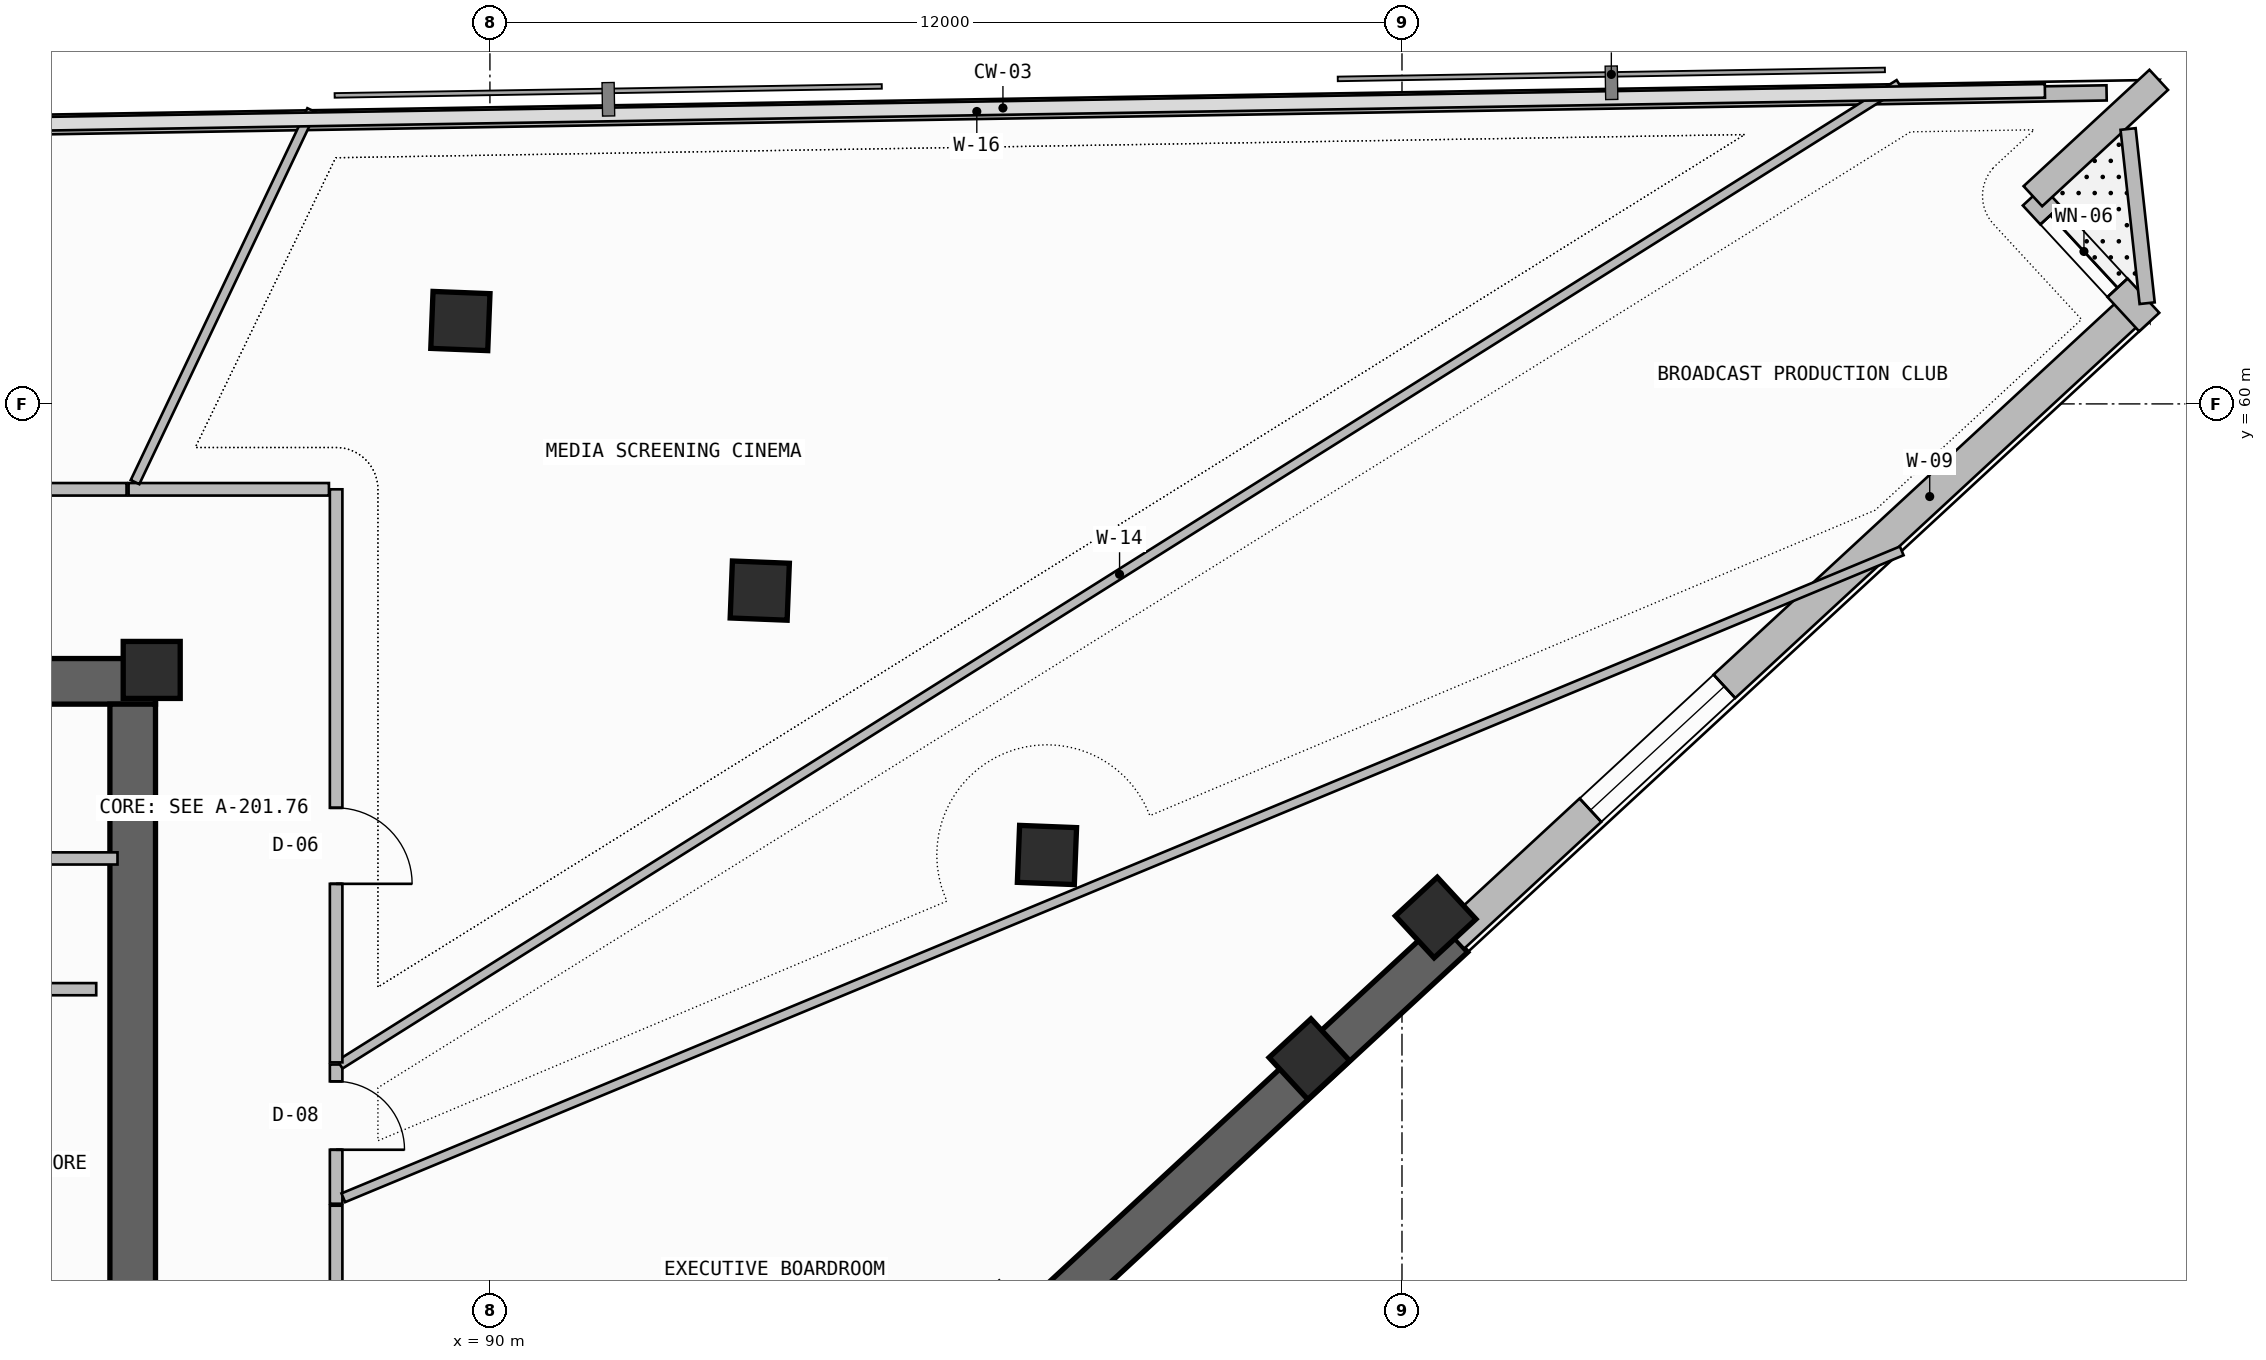
"""IFC4 building model, lengths in metres.
Left out: names, types, materials, properties, quantities, classifications, styles, units other than length and angle.
Written with IfcOpenShell. Run it as: python <this file> out.ifc"""

import sys

from ifc_helpers import new_model, si_unit, direction, frame, frame_2d, origin, origin_2d, place, context, subcontext, project, spatial, rectangle, extrude, element, fill, save


model = new_model("IFC4")
c1 = context("Model", 3, precision=1e-05, world=origin(), true_north=direction((0.0, 1.0)))
c2 = subcontext(c1, "Body", "Model", "MODEL_VIEW")
j1 = project(units=[si_unit("LENGTHUNIT", "METRE"), si_unit("PLANEANGLEUNIT", "RADIAN")], contexts=[c1])
p1 = place(None, origin())
s1 = spatial("IfcSite", under=j1, at=p1, CompositionType="ELEMENT")
p2 = place(p1, origin())
s2 = spatial("IfcBuilding", under=s1, at=p2, CompositionType="ELEMENT")
p3 = place(p2, frame((0.0, 0.0, 271.3)))
s3 = spatial("IfcBuildingStorey", under=s2, at=p3, CompositionType="ELEMENT", Elevation=271.3)
p4 = place(p3, frame((72.0, 56.35, -0.26), z_axis=(0.0, 0.0, 1.0), x_axis=(1.0, 0.0, 0.0)))
e1 = element("IfcWall", 1, at=p4, inside=s3, PredefinedType="SHEAR", context=c2, shape_type="SweptSolid", body=[
    extrude(rectangle(XDim=13.6, YDim=0.6, at=frame_2d((6.8, 0.0))), origin(), (0.0, 0.0, 1.0), 3.52),
])
p5 = place(p3, frame((85.3, 47.6, -0.26), z_axis=(0.0, 0.0, 1.0), x_axis=(0.0, 1.0, 0.0)))
e2 = element("IfcWall", 2, at=p5, inside=s3, PredefinedType="SHEAR", context=c2, shape_type="SweptSolid", body=[
    extrude(rectangle(XDim=8.45, YDim=0.6, at=frame_2d((4.225, 0.0))), origin(), (0.0, 0.0, 1.0), 3.52),
])
for number, where, z_axis, x_axis in (
    (3, (85.55, 56.5, 0.0), (0.0, 0.0, 1.0), (1.0, 0.0, 0.0)),
    (4, (102.443, 53.242, 0.0), (0.0, 0.0, 1.0), (0.734, 0.679, 0.0)),
    (5, (100.782, 51.38, 0.0), (0.0, 0.0, 1.0), (0.734, 0.679, 0.0)),
    (6, (97.329, 54.065, 0.0), (0.0, 0.0, 1.0), (0.039, 0.999, 0.0)),
    (7, (93.55, 57.544, 0.0), (0.0, 0.0, 1.0), (0.039, 0.999, 0.0)),
    (8, (89.611, 61.09, 0.0), (0.0, 0.0, 1.0), (0.039, 0.999, 0.0)),
):
    element("IfcColumn", number, at=place(p3, frame(where, z_axis=z_axis, x_axis=x_axis)), inside=s3, PredefinedType="COLUMN", context=c2, shape_type="SweptSolid", body=[
        extrude(rectangle(XDim=0.75, YDim=0.75, at=origin_2d()), origin(), (0.0, 0.0, 1.0), 3.52),
    ])
p6 = place(p3, frame((90.508, 41.74, -0.26), z_axis=(0.0, 0.0, 1.0), x_axis=(0.734315848115, 0.678807951638, 0.0)))
e9 = element("IfcWall", 9, at=p6, inside=s3, PredefinedType="SHEAR", context=c2, shape_type="SweptSolid", body=[
    extrude(rectangle(XDim=16.573, YDim=0.55, at=frame_2d((8.286, 0.0))), origin(), (0.0, 0.0, 1.0), 3.52),
])
p7 = place(p3, frame((102.677, 52.989, 0.0), z_axis=(0.0, 0.0, 1.0), x_axis=(0.734331107219, 0.678791444386, 0.0)))
e10 = element("IfcWall", 10, at=p7, inside=s3, PredefinedType="SOLIDWALL", context=c2, shape_type="SweptSolid", body=[
    extrude(rectangle(XDim=12.211, YDim=0.42, at=frame_2d((6.106, 0.0))), origin(), (0.0, 0.0, 1.0), 2.245),
])
p8 = place(p7, frame((2.454, 0.0, 0.965)))
e11 = element("IfcOpeningElement", 11, at=p8, cuts=e10, PredefinedType="OPENING", context=c2, shape_type="SweptSolid", body=[
    extrude(rectangle(XDim=2.4, YDim=1.2, at=frame_2d((1.2, 0.6))), frame((0.0, 0.22, 0.0), z_axis=(0.0, -1.0, 0.0), x_axis=(1.0, 0.0, 0.0)), (0.0, 0.0, 1.0), 0.44),
])
p9 = place(p3, frame((111.832, 61.076, 0.0), z_axis=(0.0, 0.0, 1.0), x_axis=(-0.678792531533, 0.734330102294, 0.0)))
e12 = element("IfcWall", 12, at=p9, inside=s3, PredefinedType="SOLIDWALL", context=c2, shape_type="SweptSolid", body=[
    extrude(rectangle(XDim=2.255, YDim=0.36, at=frame_2d((1.127, 0.0))), origin(), (0.0, 0.0, 1.0), 3.26),
])
p10 = place(p9, frame((0.615, 0.0, 0.45)))
e13 = element("IfcOpeningElement", 13, at=p10, cuts=e12, PredefinedType="OPENING", context=c2, shape_type="SweptSolid", body=[
    extrude(rectangle(XDim=1.3, YDim=2.4, at=frame_2d((0.65, 1.2))), frame((0.0, 0.19, 0.0), z_axis=(0.0, -1.0, 0.0), x_axis=(1.0, 0.0, 0.0)), (0.0, 0.0, 1.0), 0.38),
])
p11 = place(p3, frame((110.301, 62.732, 0.0), z_axis=(0.0, 0.0, 1.0), x_axis=(0.734330102294, 0.678792531533, 0.0)))
e14 = element("IfcWall", 14, at=p11, inside=s3, PredefinedType="SOLIDWALL", context=c2, shape_type="SweptSolid", body=[
    extrude(rectangle(XDim=2.255, YDim=0.36, at=frame_2d((1.127, 0.0))), origin(), (0.0, 0.0, 1.0), 3.26),
])
p12 = place(p3, frame((111.804, 61.325, 0.0), z_axis=(0.0, 0.0, 1.0), x_axis=(-0.10875765817, 0.994068293323, 0.0)))
e15 = element("IfcWall", 15, at=p12, inside=s3, PredefinedType="PARAPET", context=c2, shape_type="SweptSolid", body=[
    extrude(rectangle(XDim=2.305, YDim=0.2, at=frame_2d((1.153, 0.0))), origin(), (0.0, 0.0, 1.0), 1.15),
])
p13 = place(p3, frame((111.271, 64.092, 0.0), z_axis=(0.0, 0.0, 1.0), x_axis=(-0.999864741935, -0.016446818413, 0.0)))
e16 = element("IfcWall", 16, at=p13, inside=s3, PredefinedType="PARAPET", context=c2, shape_type="SweptSolid", body=[
    extrude(rectangle(XDim=29.733, YDim=0.2, at=frame_2d((14.866, 0.0))), origin(), (0.0, 0.0, 1.0), 1.15),
])
p14 = place(p3, frame((80.6, 52.3, 0.0), z_axis=(0.0, 0.0, 1.0), x_axis=(1.0, 0.0, 0.0)))
e17 = element("IfcWall", 17, at=p14, inside=s3, PredefinedType="SOLIDWALL", context=c2, shape_type="SweptSolid", body=[
    extrude(rectangle(XDim=4.22, YDim=0.16, at=frame_2d((2.11, 0.0))), origin(), (0.0, 0.0, 1.0), 3.26),
])
p15 = place(p3, frame((73.02, 54.02, 0.0), z_axis=(0.0, 0.0, 1.0), x_axis=(1.0, 0.0, 0.0)))
e18 = element("IfcWall", 18, at=p15, inside=s3, PredefinedType="SOLIDWALL", context=c2, shape_type="SweptSolid", body=[
    extrude(rectangle(XDim=12.08, YDim=0.16, at=frame_2d((6.04, 0.0))), origin(), (0.0, 0.0, 1.0), 3.26),
])
p16 = place(p15, frame((4.03, 0.0, 0.0)))
e19 = element("IfcOpeningElement", 19, at=p16, cuts=e18, PredefinedType="OPENING", context=c2, shape_type="SweptSolid", body=[
    extrude(rectangle(XDim=1.1, YDim=2.25, at=frame_2d((0.55, 1.125))), frame((0.0, 0.09, 0.0), z_axis=(0.0, -1.0, 0.0), x_axis=(1.0, 0.0, 0.0)), (0.0, 0.0, 1.0), 0.18),
])
p17 = place(p15, frame((6.28, 0.0, 0.0)))
e20 = element("IfcOpeningElement", 20, at=p17, cuts=e18, PredefinedType="OPENING", context=c2, shape_type="SweptSolid", body=[
    extrude(rectangle(XDim=1.1, YDim=2.25, at=frame_2d((0.55, 1.125))), frame((0.0, 0.09, 0.0), z_axis=(0.0, -1.0, 0.0), x_axis=(1.0, 0.0, 0.0)), (0.0, 0.0, 1.0), 0.18),
])
p18 = place(p15, frame((8.53, 0.0, 0.0)))
e21 = element("IfcOpeningElement", 21, at=p18, cuts=e18, PredefinedType="OPENING", context=c2, shape_type="SweptSolid", body=[
    extrude(rectangle(XDim=1.1, YDim=2.25, at=frame_2d((0.55, 1.125))), frame((0.0, 0.09, 0.0), z_axis=(0.0, -1.0, 0.0), x_axis=(1.0, 0.0, 0.0)), (0.0, 0.0, 1.0), 0.18),
])
p19 = place(p3, frame((87.976, 49.477, 0.0), z_axis=(0.0, 0.0, 1.0), x_axis=(0.0, 1.0, 0.0)))
e22 = element("IfcWall", 22, at=p19, inside=s3, PredefinedType="PARTITIONING", context=c2, shape_type="SweptSolid", body=[
    extrude(rectangle(XDim=1.832, YDim=0.165, at=frame_2d((0.916, 0.0))), origin(), (0.0, 0.0, 1.0), 3.26),
])
p20 = place(p19, frame((0.71, 0.0, 0.0)))
e23 = element("IfcOpeningElement", 23, at=p20, cuts=e22, PredefinedType="OPENING", context=c2, shape_type="SweptSolid", body=[
    extrude(rectangle(XDim=0.9, YDim=2.1, at=frame_2d((0.45, 1.05))), frame((0.0, 0.093, 0.0), z_axis=(0.0, -1.0, 0.0), x_axis=(1.0, 0.0, 0.0)), (0.0, 0.0, 1.0), 0.185),
])
p21 = place(p3, frame((108.575, 58.067, 0.0), z_axis=(0.0, 0.0, 1.0), x_axis=(-0.923597614344, -0.383363335203, 0.0)))
e24 = element("IfcWall", 24, at=p21, inside=s3, PredefinedType="PARTITIONING", context=c2, shape_type="SweptSolid", body=[
    extrude(rectangle(XDim=22.201, YDim=0.125, at=frame_2d((11.101, 0.0))), origin(), (0.0, 0.0, 1.0), 2.645),
])
p22 = place(p3, frame((88.027, 51.309, 0.0), z_axis=(0.0, 0.0, 1.0), x_axis=(0.846577402355, 0.532265630885, 0.0)))
e25 = element("IfcWall", 25, at=p22, inside=s3, PredefinedType="PARTITIONING", context=c2, shape_type="SweptSolid", body=[
    extrude(rectangle(XDim=24.232, YDim=0.125, at=frame_2d((12.116, 0.0))), origin(), (0.0, 0.0, 1.0), 2.645),
])
p23 = place(p3, frame((87.976, 47.62, 0.0), z_axis=(0.0, 0.0, 1.0), x_axis=(0.0, 1.0, 0.0)))
e26 = element("IfcWall", 26, at=p23, inside=s3, PredefinedType="PARTITIONING", context=c2, shape_type="SweptSolid", body=[
    extrude(rectangle(XDim=1.831, YDim=0.165, at=frame_2d((0.916, 0.0))), origin(), (0.0, 0.0, 1.0), 3.26),
])
p24 = place(p3, frame((87.976, 51.337, 0.0), z_axis=(0.0, 0.0, 1.0), x_axis=(0.0, 1.0, 0.0)))
e27 = element("IfcWall", 27, at=p24, inside=s3, PredefinedType="PARTITIONING", context=c2, shape_type="SweptSolid", body=[
    extrude(rectangle(XDim=7.539, YDim=0.165, at=frame_2d((3.77, 0.0))), origin(), (0.0, 0.0, 1.0), 2.745),
])
p25 = place(p24, frame((2.349, 0.0, 0.0)))
e28 = element("IfcOpeningElement", 28, at=p25, cuts=e27, PredefinedType="OPENING", context=c2, shape_type="SweptSolid", body=[
    extrude(rectangle(XDim=1.0, YDim=2.2, at=frame_2d((0.5, 1.1))), frame((0.0, 0.093, 0.0), z_axis=(0.0, -1.0, 0.0), x_axis=(1.0, 0.0, 0.0)), (0.0, 0.0, 1.0), 0.185),
])
p26 = place(p3, frame((87.882, 58.876, 0.0), z_axis=(0.0, 0.0, 1.0), x_axis=(-1.0, 0.0, 0.0)))
e29 = element("IfcWall", 29, at=p26, inside=s3, PredefinedType="PARTITIONING", context=c2, shape_type="SweptSolid", body=[
    extrude(rectangle(XDim=2.636, YDim=0.165, at=frame_2d((1.318, 0.0))), origin(), (0.0, 0.0, 1.0), 2.745),
])
p27 = place(p3, frame((85.331, 58.971, 0.0), z_axis=(0.0, 0.0, 1.0), x_axis=(0.429074283855, 0.903269206236, 0.0)))
e30 = element("IfcWall", 30, at=p27, inside=s3, PredefinedType="PARTITIONING", context=c2, shape_type="SweptSolid", body=[
    extrude(rectangle(XDim=5.416, YDim=0.125, at=frame_2d((2.708, 0.0))), origin(), (0.0, 0.0, 1.0), 3.26),
])
p28 = place(p3, frame((85.219, 58.876, 0.0), z_axis=(0.0, 0.0, 1.0), x_axis=(-1.0, 0.0, 0.0)))
e31 = element("IfcWall", 31, at=p28, inside=s3, PredefinedType="PARTITIONING", context=c2, shape_type="SweptSolid", body=[
    extrude(rectangle(XDim=5.569, YDim=0.165, at=frame_2d((2.785, 0.0))), origin(), (0.0, 0.0, 1.0), 3.26),
])
p29 = place(p28, frame((2.284, 0.0, 0.0)))
e32 = element("IfcOpeningElement", 32, at=p29, cuts=e31, PredefinedType="OPENING", context=c2, shape_type="SweptSolid", body=[
    extrude(rectangle(XDim=1.0, YDim=2.2, at=frame_2d((0.5, 1.1))), frame((0.0, 0.093, 0.0), z_axis=(0.0, -1.0, 0.0), x_axis=(1.0, 0.0, 0.0)), (0.0, 0.0, 1.0), 0.185),
])
p30 = place(p8, origin())
e33 = element("IfcWindow", 33, at=p30, inside=s3, PartitioningType="SINGLE_PANEL", PredefinedType="WINDOW", context=c2, shape_type="SweptSolid", body=[
    extrude(rectangle(XDim=2.4, YDim=1.2, at=frame_2d((1.2, 0.6))), frame((0.0, 0.03, 0.0), z_axis=(0.0, -1.0, 0.0), x_axis=(1.0, 0.0, 0.0)), (0.0, 0.0, 1.0), 0.06),
])
fill(e11, e33)
p31 = place(p10, origin())
e34 = element("IfcWindow", 34, at=p31, inside=s3, PartitioningType="SINGLE_PANEL", PredefinedType="WINDOW", context=c2, shape_type="SweptSolid", body=[
    extrude(rectangle(XDim=1.3, YDim=2.4, at=frame_2d((0.65, 1.2))), frame((0.0, 0.03, 0.0), z_axis=(0.0, -1.0, 0.0), x_axis=(1.0, 0.0, 0.0)), (0.0, 0.0, 1.0), 0.06),
])
fill(e13, e34)
p32 = place(p20, frame((0.9, 0.0, 0.0), z_axis=(0.0, 0.0, 1.0), x_axis=(-1.0, 0.0, 0.0)))
e35 = element("IfcDoor", 35, at=p32, inside=s3, OperationType="SINGLE_SWING_RIGHT", PredefinedType="DOOR", context=c2, shape_type="SweptSolid", body=[
    extrude(rectangle(XDim=0.9, YDim=2.1, at=frame_2d((0.45, 1.05))), frame((0.0, 0.025, 0.0), z_axis=(0.0, -1.0, 0.0), x_axis=(1.0, 0.0, 0.0)), (0.0, 0.0, 1.0), 0.05),
])
fill(e23, e35)
p33 = place(p25, frame((1.0, 0.0, 0.0), z_axis=(0.0, 0.0, 1.0), x_axis=(-1.0, 0.0, 0.0)))
e36 = element("IfcDoor", 36, at=p33, inside=s3, OperationType="SINGLE_SWING_RIGHT", PredefinedType="DOOR", context=c2, shape_type="SweptSolid", body=[
    extrude(rectangle(XDim=1.0, YDim=2.2, at=frame_2d((0.5, 1.1))), frame((0.0, 0.025, 0.0), z_axis=(0.0, -1.0, 0.0), x_axis=(1.0, 0.0, 0.0)), (0.0, 0.0, 1.0), 0.05),
])
fill(e28, e36)
save(model, sys.argv[1])
